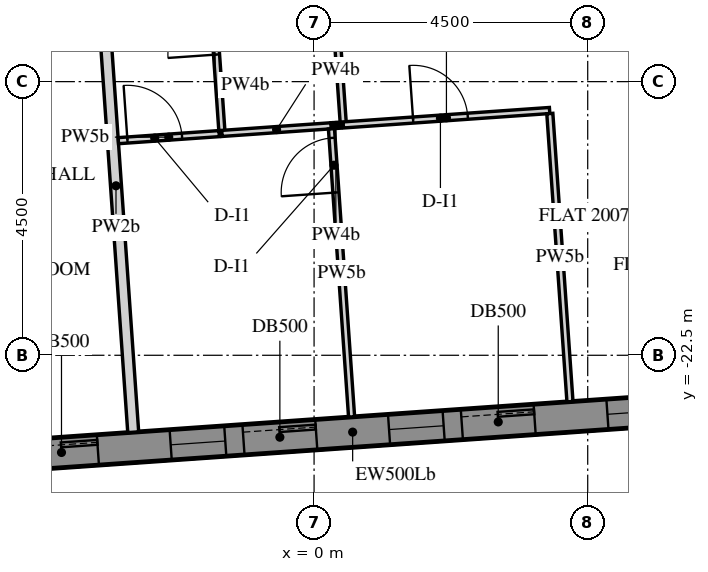
"""IFC4 building model, lengths in metres.
Left out: names, types, materials, properties, quantities, classifications, styles, units other than length and angle.
Written with IfcOpenShell. Run it as: python <this file> out.ifc"""

import sys

from ifc_helpers import new_model, si_unit, direction, frame, frame_2d, origin, place, context, subcontext, project, spatial, polyline, rectangle, outline, extrude, element, fill, save


model = new_model("IFC4")
c1 = context("Model", 3, precision=1e-05, world=origin(), true_north=direction((0.0, 1.0)))
c2 = subcontext(c1, "Body", "Model", "MODEL_VIEW")
j1 = project(units=[si_unit("LENGTHUNIT", "METRE"), si_unit("PLANEANGLEUNIT", "RADIAN")], contexts=[c1])
p1 = place(None, origin())
s1 = spatial("IfcSite", under=j1, at=p1, CompositionType="ELEMENT")
p2 = place(p1, origin())
s2 = spatial("IfcBuilding", under=s1, at=p2, CompositionType="ELEMENT")
p3 = place(p2, frame((0.0, 0.0, 256.2)))
s3 = spatial("IfcBuildingStorey", under=s2, at=p3, CompositionType="ELEMENT", Elevation=256.2)
p4 = place(p3, frame((-10.86, -24.567, 0.0), z_axis=(0.0, 0.0, 1.0), x_axis=(0.997564329317, 0.06975248292, 0.0)))
e1 = element("IfcWall", 1, at=p4, inside=s3, PredefinedType="SOLIDWALL", context=c2, shape_type="SweptSolid", body=[
    extrude(outline(polyline([(0.25, -0.25), (22.795, -0.25), (23.295, 0.25), (-0.25, 0.25), (0.25, -0.25)])), origin(), (0.0, 0.0, 1.0), 3.75),
])
p5 = place(p4, frame((1.323, 0.0, 0.9)))
e2 = element("IfcOpeningElement", 2, at=p5, cuts=e1, PredefinedType="OPENING", context=c2, shape_type="SweptSolid", body=[
    extrude(rectangle(XDim=0.9, YDim=1.5, at=frame_2d((0.45, 0.75))), frame((0.0, 0.26, 0.0), z_axis=(0.0, -1.0, 0.0), x_axis=(1.0, 0.0, 0.0)), (0.0, 0.0, 1.0), 0.52),
])
p6 = place(p4, frame((2.522, 0.0, 0.0)))
e3 = element("IfcOpeningElement", 3, at=p6, cuts=e1, PredefinedType="OPENING", context=c2, shape_type="SweptSolid", body=[
    extrude(rectangle(XDim=1.2, YDim=2.4, at=frame_2d((0.6, 1.2))), frame((0.0, 0.26, 0.0), z_axis=(0.0, -1.0, 0.0), x_axis=(1.0, 0.0, 0.0)), (0.0, 0.0, 1.0), 0.52),
])
p7 = place(p4, frame((4.922, 0.0, 0.9)))
e4 = element("IfcOpeningElement", 4, at=p7, cuts=e1, PredefinedType="OPENING", context=c2, shape_type="SweptSolid", body=[
    extrude(rectangle(XDim=0.9, YDim=1.5, at=frame_2d((0.45, 0.75))), frame((0.0, 0.26, 0.0), z_axis=(0.0, -1.0, 0.0), x_axis=(1.0, 0.0, 0.0)), (0.0, 0.0, 1.0), 0.52),
])
p8 = place(p4, frame((6.122, 0.0, 0.0)))
e5 = element("IfcOpeningElement", 5, at=p8, cuts=e1, PredefinedType="OPENING", context=c2, shape_type="SweptSolid", body=[
    extrude(rectangle(XDim=1.2, YDim=2.4, at=frame_2d((0.6, 1.2))), frame((0.0, 0.26, 0.0), z_axis=(0.0, -1.0, 0.0), x_axis=(1.0, 0.0, 0.0)), (0.0, 0.0, 1.0), 0.52),
])
p9 = place(p4, frame((8.522, 0.0, 0.9)))
e6 = element("IfcOpeningElement", 6, at=p9, cuts=e1, PredefinedType="OPENING", context=c2, shape_type="SweptSolid", body=[
    extrude(rectangle(XDim=0.9, YDim=1.5, at=frame_2d((0.45, 0.75))), frame((0.0, 0.26, 0.0), z_axis=(0.0, -1.0, 0.0), x_axis=(1.0, 0.0, 0.0)), (0.0, 0.0, 1.0), 0.52),
])
p10 = place(p4, frame((9.722, 0.0, 0.0)))
e7 = element("IfcOpeningElement", 7, at=p10, cuts=e1, PredefinedType="OPENING", context=c2, shape_type="SweptSolid", body=[
    extrude(rectangle(XDim=1.2, YDim=2.4, at=frame_2d((0.6, 1.2))), frame((0.0, 0.26, 0.0), z_axis=(0.0, -1.0, 0.0), x_axis=(1.0, 0.0, 0.0)), (0.0, 0.0, 1.0), 0.52),
])
p11 = place(p4, frame((12.122, 0.0, 0.9)))
e8 = element("IfcOpeningElement", 8, at=p11, cuts=e1, PredefinedType="OPENING", context=c2, shape_type="SweptSolid", body=[
    extrude(rectangle(XDim=0.9, YDim=1.5, at=frame_2d((0.45, 0.75))), frame((0.0, 0.26, 0.0), z_axis=(0.0, -1.0, 0.0), x_axis=(1.0, 0.0, 0.0)), (0.0, 0.0, 1.0), 0.52),
])
p12 = place(p4, frame((13.323, 0.0, 0.0)))
e9 = element("IfcOpeningElement", 9, at=p12, cuts=e1, PredefinedType="OPENING", context=c2, shape_type="SweptSolid", body=[
    extrude(rectangle(XDim=1.2, YDim=2.4, at=frame_2d((0.6, 1.2))), frame((0.0, 0.26, 0.0), z_axis=(0.0, -1.0, 0.0), x_axis=(1.0, 0.0, 0.0)), (0.0, 0.0, 1.0), 0.52),
])
p13 = place(p4, frame((15.722, 0.0, 0.9)))
e10 = element("IfcOpeningElement", 10, at=p13, cuts=e1, PredefinedType="OPENING", context=c2, shape_type="SweptSolid", body=[
    extrude(rectangle(XDim=0.9, YDim=1.5, at=frame_2d((0.45, 0.75))), frame((0.0, 0.26, 0.0), z_axis=(0.0, -1.0, 0.0), x_axis=(1.0, 0.0, 0.0)), (0.0, 0.0, 1.0), 0.52),
])
p14 = place(p4, frame((16.922, 0.0, 0.0)))
e11 = element("IfcOpeningElement", 11, at=p14, cuts=e1, PredefinedType="OPENING", context=c2, shape_type="SweptSolid", body=[
    extrude(rectangle(XDim=1.2, YDim=2.4, at=frame_2d((0.6, 1.2))), frame((0.0, 0.26, 0.0), z_axis=(0.0, -1.0, 0.0), x_axis=(1.0, 0.0, 0.0)), (0.0, 0.0, 1.0), 0.52),
])
p15 = place(p4, frame((19.323, 0.0, 0.9)))
e12 = element("IfcOpeningElement", 12, at=p15, cuts=e1, PredefinedType="OPENING", context=c2, shape_type="SweptSolid", body=[
    extrude(rectangle(XDim=0.9, YDim=1.5, at=frame_2d((0.45, 0.75))), frame((0.0, 0.26, 0.0), z_axis=(0.0, -1.0, 0.0), x_axis=(1.0, 0.0, 0.0)), (0.0, 0.0, 1.0), 0.52),
])
p16 = place(p4, frame((20.522, 0.0, 0.0)))
e13 = element("IfcOpeningElement", 13, at=p16, cuts=e1, PredefinedType="OPENING", context=c2, shape_type="SweptSolid", body=[
    extrude(rectangle(XDim=1.2, YDim=2.4, at=frame_2d((0.6, 1.2))), frame((0.0, 0.26, 0.0), z_axis=(0.0, -1.0, 0.0), x_axis=(1.0, 0.0, 0.0)), (0.0, 0.0, 1.0), 0.52),
])
p17 = place(p3, frame((-2.974, -23.765, 0.0), z_axis=(0.0, 0.0, 1.0), x_axis=(-0.069771417753, 0.99756300516, 0.0)))
e14 = element("IfcWall", 14, at=p17, inside=s3, PredefinedType="PARTITIONING", context=c2, shape_type="SweptSolid", body=[
    extrude(rectangle(XDim=8.125, YDim=0.18, at=frame_2d((4.062, 0.0))), origin(), (0.0, 0.0, 1.0), 2.823),
])
p18 = place(p3, frame((0.25, -15.395, 0.0), z_axis=(0.0, 0.0, 1.0), x_axis=(0.069754598287, -0.997564181403, 0.0)))
e15 = element("IfcWall", 15, at=p18, inside=s3, PredefinedType="PARTITIONING", context=c2, shape_type="SweptSolid", body=[
    extrude(rectangle(XDim=3.325, YDim=0.1, at=frame_2d((1.663, 0.0))), origin(), (0.0, 0.0, 1.0), 2.823),
])
p19 = place(p3, frame((0.48, -18.712, 0.0), z_axis=(0.0, 0.0, 1.0), x_axis=(0.997564312984, 0.069752716511, 0.0)))
e16 = element("IfcWall", 16, at=p19, inside=s3, PredefinedType="PARTITIONING", context=c2, shape_type="SweptSolid", body=[
    extrude(rectangle(XDim=3.402, YDim=0.1, at=frame_2d((1.701, 0.0))), origin(), (0.0, 0.0, 1.0), 2.823),
])
p20 = place(p19, frame((1.152, 0.0, 0.0)))
e17 = element("IfcOpeningElement", 17, at=p20, cuts=e16, PredefinedType="OPENING", context=c2, shape_type="SweptSolid", body=[
    extrude(rectangle(XDim=0.9, YDim=2.1, at=frame_2d((0.45, 1.05))), frame((0.0, 0.06, 0.0), z_axis=(0.0, -1.0, 0.0), x_axis=(1.0, 0.0, 0.0)), (0.0, 0.0, 1.0), 0.12),
])
p21 = place(p3, frame((3.877, -18.525, 0.0), z_axis=(0.0, 0.0, 1.0), x_axis=(0.069745758817, -0.997564799463, 0.0)))
e18 = element("IfcWall", 18, at=p21, inside=s3, PredefinedType="PARTITIONING", context=c2, shape_type="SweptSolid", body=[
    extrude(rectangle(XDim=4.75, YDim=0.1, at=frame_2d((2.375, 0.0))), origin(), (0.0, 0.0, 1.0), 2.823),
])
p22 = place(p3, frame((-1.513, -18.852, 0.0), z_axis=(0.0, 0.0, 1.0), x_axis=(-0.069754598287, 0.997564181403, 0.0)))
e19 = element("IfcWall", 19, at=p22, inside=s3, PredefinedType="PARTITIONING", context=c2, shape_type="SweptSolid", body=[
    extrude(rectangle(XDim=3.325, YDim=0.1, at=frame_2d((1.663, 0.0))), origin(), (0.0, 0.0, 1.0), 2.823),
])
p23 = place(p22, frame((1.3, 0.0, 0.0)))
e20 = element("IfcOpeningElement", 20, at=p23, cuts=e19, PredefinedType="OPENING", context=c2, shape_type="SweptSolid", body=[
    extrude(rectangle(XDim=0.8, YDim=2.1, at=frame_2d((0.4, 1.05))), frame((0.0, 0.06, 0.0), z_axis=(0.0, -1.0, 0.0), x_axis=(1.0, 0.0, 0.0)), (0.0, 0.0, 1.0), 0.12),
])
p24 = place(p3, frame((-3.219, -18.971, 0.0), z_axis=(0.0, 0.0, 1.0), x_axis=(0.9975627517, 0.069775041534, 0.0)))
e21 = element("IfcWall", 21, at=p24, inside=s3, PredefinedType="PARTITIONING", context=c2, shape_type="SweptSolid", body=[
    extrude(rectangle(XDim=1.662, YDim=0.1, at=frame_2d((0.831, 0.0))), origin(), (0.0, 0.0, 1.0), 2.823),
])
p25 = place(p24, frame((0.15, 0.0, 0.0)))
e22 = element("IfcOpeningElement", 22, at=p25, cuts=e21, PredefinedType="OPENING", context=c2, shape_type="SweptSolid", body=[
    extrude(rectangle(XDim=0.9, YDim=2.1, at=frame_2d((0.45, 1.05))), frame((0.0, 0.06, 0.0), z_axis=(0.0, -1.0, 0.0), x_axis=(1.0, 0.0, 0.0)), (0.0, 0.0, 1.0), 0.12),
])
p26 = place(p3, frame((-1.515, -18.852, 0.0), z_axis=(0.0, 0.0, 1.0), x_axis=(0.997562835018, 0.069773850337, 0.0)))
e23 = element("IfcWall", 23, at=p26, inside=s3, PredefinedType="PARTITIONING", context=c2, shape_type="SweptSolid", body=[
    extrude(rectangle(XDim=1.802, YDim=0.1, at=frame_2d((0.901, 0.0))), origin(), (0.0, 0.0, 1.0), 2.823),
])
p27 = place(p3, frame((0.282, -18.726, 0.0), z_axis=(0.0, 0.0, 1.0), x_axis=(0.997611278984, 0.069077753617, 0.0)))
e24 = element("IfcWall", 24, at=p27, inside=s3, PredefinedType="PARTITIONING", context=c2, shape_type="SweptSolid", body=[
    extrude(rectangle(XDim=0.152, YDim=0.1, at=frame_2d((0.076, 0.0))), origin(), (0.0, 0.0, 1.0), 2.823),
])
p28 = place(p3, frame((0.617, -23.514, 0.0), z_axis=(0.0, 0.0, 1.0), x_axis=(-0.069749334994, 0.997564549424, 0.0)))
e25 = element("IfcWall", 25, at=p28, inside=s3, PredefinedType="PARTITIONING", context=c2, shape_type="SweptSolid", body=[
    extrude(rectangle(XDim=4.75, YDim=0.1, at=frame_2d((2.375, 0.0))), origin(), (0.0, 0.0, 1.0), 2.823),
])
p29 = place(p28, frame((3.7, 0.0, 0.0)))
e26 = element("IfcOpeningElement", 26, at=p29, cuts=e25, PredefinedType="OPENING", context=c2, shape_type="SweptSolid", body=[
    extrude(rectangle(XDim=0.9, YDim=2.1, at=frame_2d((0.45, 1.05))), frame((0.0, 0.06, 0.0), z_axis=(0.0, -1.0, 0.0), x_axis=(1.0, 0.0, 0.0)), (0.0, 0.0, 1.0), 0.12),
])
p30 = place(p8, frame((0.0, 0.175, 0.0)))
e27 = element("IfcDoor", 27, at=p30, inside=s3, OperationType="SLIDING_TO_LEFT", PredefinedType="DOOR", context=c2, shape_type="SweptSolid", body=[
    extrude(rectangle(XDim=1.2, YDim=2.4, at=frame_2d((0.6, 1.2))), frame((0.0, 0.025, 0.0), z_axis=(0.0, -1.0, 0.0), x_axis=(1.0, 0.0, 0.0)), (0.0, 0.0, 1.0), 0.05),
])
fill(e5, e27)
p31 = place(p9, frame((0.0, 0.18, 0.0)))
e28 = element("IfcWindow", 28, at=p31, inside=s3, PartitioningType="SINGLE_PANEL", PredefinedType="WINDOW", context=c2, shape_type="SweptSolid", body=[
    extrude(rectangle(XDim=0.9, YDim=1.5, at=frame_2d((0.45, 0.75))), frame((0.0, 0.03, 0.0), z_axis=(0.0, -1.0, 0.0), x_axis=(1.0, 0.0, 0.0)), (0.0, 0.0, 1.0), 0.06),
])
fill(e6, e28)
p32 = place(p10, frame((0.0, 0.175, 0.0)))
e29 = element("IfcDoor", 29, at=p32, inside=s3, OperationType="SLIDING_TO_LEFT", PredefinedType="DOOR", context=c2, shape_type="SweptSolid", body=[
    extrude(rectangle(XDim=1.2, YDim=2.4, at=frame_2d((0.6, 1.2))), frame((0.0, 0.025, 0.0), z_axis=(0.0, -1.0, 0.0), x_axis=(1.0, 0.0, 0.0)), (0.0, 0.0, 1.0), 0.05),
])
fill(e7, e29)
p33 = place(p11, frame((0.0, 0.18, 0.0)))
e30 = element("IfcWindow", 30, at=p33, inside=s3, PartitioningType="SINGLE_PANEL", PredefinedType="WINDOW", context=c2, shape_type="SweptSolid", body=[
    extrude(rectangle(XDim=0.9, YDim=1.5, at=frame_2d((0.45, 0.75))), frame((0.0, 0.03, 0.0), z_axis=(0.0, -1.0, 0.0), x_axis=(1.0, 0.0, 0.0)), (0.0, 0.0, 1.0), 0.06),
])
fill(e8, e30)
p34 = place(p12, frame((0.0, 0.175, 0.0)))
e31 = element("IfcDoor", 31, at=p34, inside=s3, OperationType="SLIDING_TO_LEFT", PredefinedType="DOOR", context=c2, shape_type="SweptSolid", body=[
    extrude(rectangle(XDim=1.2, YDim=2.4, at=frame_2d((0.6, 1.2))), frame((0.0, 0.025, 0.0), z_axis=(0.0, -1.0, 0.0), x_axis=(1.0, 0.0, 0.0)), (0.0, 0.0, 1.0), 0.05),
])
fill(e9, e31)
p35 = place(p13, frame((0.0, 0.18, 0.0)))
e32 = element("IfcWindow", 32, at=p35, inside=s3, PartitioningType="SINGLE_PANEL", PredefinedType="WINDOW", context=c2, shape_type="SweptSolid", body=[
    extrude(rectangle(XDim=0.9, YDim=1.5, at=frame_2d((0.45, 0.75))), frame((0.0, 0.03, 0.0), z_axis=(0.0, -1.0, 0.0), x_axis=(1.0, 0.0, 0.0)), (0.0, 0.0, 1.0), 0.06),
])
fill(e10, e32)
p36 = place(p23, origin())
e33 = element("IfcDoor", 33, at=p36, inside=s3, OperationType="SINGLE_SWING_LEFT", PredefinedType="DOOR", context=c2, shape_type="SweptSolid", body=[
    extrude(rectangle(XDim=0.8, YDim=2.1, at=frame_2d((0.4, 1.05))), frame((0.0, 0.025, 0.0), z_axis=(0.0, -1.0, 0.0), x_axis=(1.0, 0.0, 0.0)), (0.0, 0.0, 1.0), 0.05),
])
fill(e20, e33)
p37 = place(p25, origin())
e34 = element("IfcDoor", 34, at=p37, inside=s3, OperationType="SINGLE_SWING_LEFT", PredefinedType="DOOR", context=c2, shape_type="SweptSolid", body=[
    extrude(rectangle(XDim=0.9, YDim=2.1, at=frame_2d((0.45, 1.05))), frame((0.0, 0.025, 0.0), z_axis=(0.0, -1.0, 0.0), x_axis=(1.0, 0.0, 0.0)), (0.0, 0.0, 1.0), 0.05),
])
fill(e22, e34)
p38 = place(p29, origin())
e35 = element("IfcDoor", 35, at=p38, inside=s3, OperationType="SINGLE_SWING_RIGHT", PredefinedType="DOOR", context=c2, shape_type="SweptSolid", body=[
    extrude(rectangle(XDim=0.9, YDim=2.1, at=frame_2d((0.45, 1.05))), frame((0.0, 0.025, 0.0), z_axis=(0.0, -1.0, 0.0), x_axis=(1.0, 0.0, 0.0)), (0.0, 0.0, 1.0), 0.05),
])
fill(e26, e35)
p39 = place(p20, origin())
e36 = element("IfcDoor", 36, at=p39, inside=s3, OperationType="SINGLE_SWING_RIGHT", PredefinedType="DOOR", context=c2, shape_type="SweptSolid", body=[
    extrude(rectangle(XDim=0.9, YDim=2.1, at=frame_2d((0.45, 1.05))), frame((0.0, 0.025, 0.0), z_axis=(0.0, -1.0, 0.0), x_axis=(1.0, 0.0, 0.0)), (0.0, 0.0, 1.0), 0.05),
])
fill(e17, e36)
save(model, sys.argv[1])
